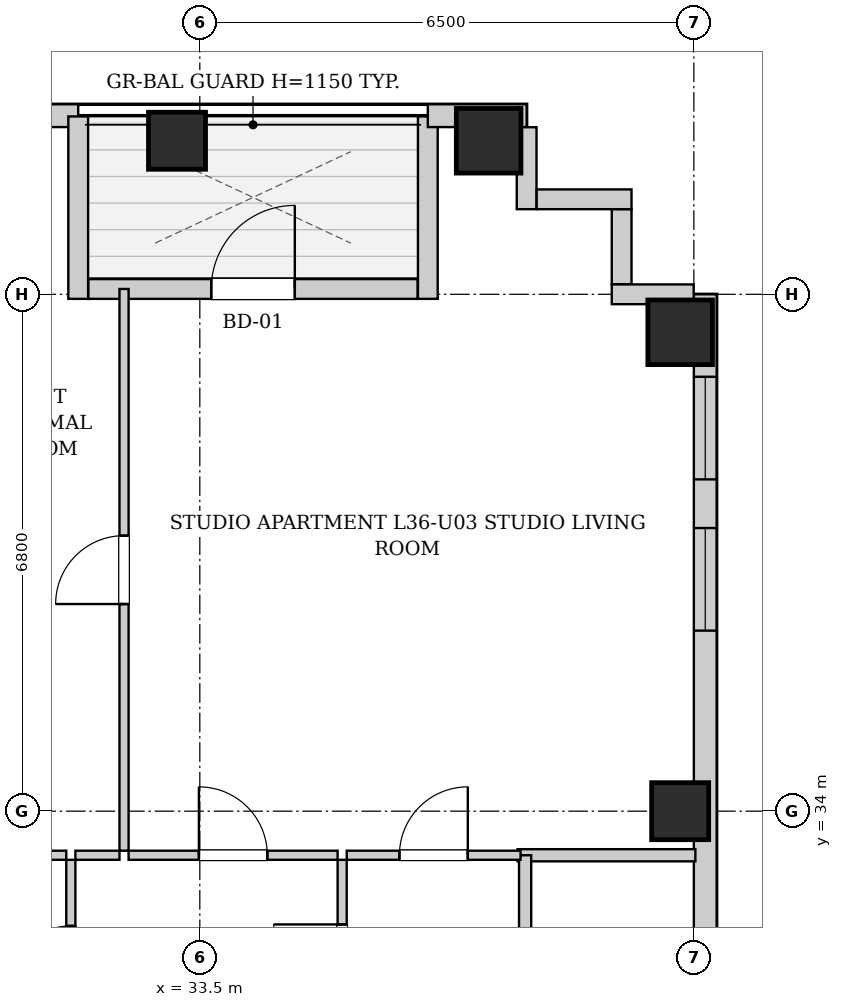
"""IFC4 building model, lengths in metres.
Left out: names, types, materials, properties, quantities, classifications, styles, units other than length and angle.
Written with IfcOpenShell. Run it as: python <this file> out.ifc"""

import sys

from ifc_helpers import new_model, si_unit, direction, frame, frame_2d, origin, origin_2d, place, context, subcontext, project, spatial, rectangle, extrude, element, fill, save


model = new_model("IFC4")
c1 = context("Model", 3, precision=1e-05, world=origin(), true_north=direction((0.0, 1.0)))
c2 = subcontext(c1, "Body", "Model", "MODEL_VIEW")
j1 = project(units=[si_unit("LENGTHUNIT", "METRE"), si_unit("PLANEANGLEUNIT", "RADIAN")], contexts=[c1])
p1 = place(None, origin())
s1 = spatial("IfcSite", under=j1, at=p1, CompositionType="ELEMENT")
p2 = place(p1, origin())
s2 = spatial("IfcBuilding", under=s1, at=p2, CompositionType="ELEMENT")
p3 = place(p2, frame((0.0, 0.0, 127.65)))
s3 = spatial("IfcBuildingStorey", under=s2, at=p3, CompositionType="ELEMENT", Elevation=127.65)
p4 = place(p3, frame((33.2, 42.82, 0.0), z_axis=(0.0, 0.0, 1.0), x_axis=(1.0, 0.0, 0.0)))
e1 = element("IfcColumn", 1, at=p4, inside=s3, PredefinedType="COLUMN", context=c2, shape_type="SweptSolid", body=[
    extrude(rectangle(XDim=0.75, YDim=0.75, at=origin_2d()), origin(), (0.0, 0.0, 1.0), 3.25),
])
p5 = place(p3, frame((37.3, 42.82, 0.0), z_axis=(0.0, 0.0, 1.0), x_axis=(1.0, 0.0, 0.0)))
e2 = element("IfcColumn", 2, at=p5, inside=s3, PredefinedType="COLUMN", context=c2, shape_type="SweptSolid", body=[
    extrude(rectangle(XDim=0.85, YDim=0.85, at=origin_2d()), origin(), (0.0, 0.0, 1.0), 3.25),
])
p6 = place(p3, frame((39.82, 34.0, 0.0), z_axis=(0.0, 0.0, 1.0), x_axis=(1.0, 0.0, 0.0)))
e3 = element("IfcColumn", 3, at=p6, inside=s3, PredefinedType="COLUMN", context=c2, shape_type="SweptSolid", body=[
    extrude(rectangle(XDim=0.75, YDim=0.75, at=origin_2d()), origin(), (0.0, 0.0, 1.0), 3.25),
])
p7 = place(p3, frame((39.82, 40.3, 0.0), z_axis=(0.0, 0.0, 1.0), x_axis=(1.0, 0.0, 0.0)))
e4 = element("IfcColumn", 4, at=p7, inside=s3, PredefinedType="COLUMN", context=c2, shape_type="SweptSolid", body=[
    extrude(rectangle(XDim=0.85, YDim=0.85, at=origin_2d()), origin(), (0.0, 0.0, 1.0), 3.25),
])
p8 = place(p3, frame((10.0, 43.15, 0.0), z_axis=(0.0, 0.0, 1.0), x_axis=(1.0, 0.0, 0.0)))
e5 = element("IfcWall", 5, at=p8, inside=s3, PredefinedType="SOLIDWALL", context=c2, shape_type="SweptSolid", body=[
    extrude(rectangle(XDim=21.9, YDim=0.3, at=frame_2d((10.95, 0.0))), origin(), (0.0, 0.0, 1.0), 2.99),
])
p9 = place(p8, frame((5.475, 0.0, 0.55)))
e6 = element("IfcOpeningElement", 6, at=p9, cuts=e5, PredefinedType="OPENING", context=c2, shape_type="SweptSolid", body=[
    extrude(rectangle(XDim=1.35, YDim=1.2, at=frame_2d((0.675, 0.6))), frame((0.0, 0.16, 0.0), z_axis=(0.0, -1.0, 0.0), x_axis=(1.0, 0.0, 0.0)), (0.0, 0.0, 1.0), 0.32),
])
p10 = place(p8, frame((9.15, 0.0, 0.55)))
e7 = element("IfcOpeningElement", 7, at=p10, cuts=e5, PredefinedType="OPENING", context=c2, shape_type="SweptSolid", body=[
    extrude(rectangle(XDim=1.35, YDim=1.2, at=frame_2d((0.675, 0.6))), frame((0.0, 0.16, 0.0), z_axis=(0.0, -1.0, 0.0), x_axis=(1.0, 0.0, 0.0)), (0.0, 0.0, 1.0), 0.32),
])
p11 = place(p8, frame((17.5, 0.0, 0.55)))
e8 = element("IfcOpeningElement", 8, at=p11, cuts=e5, PredefinedType="OPENING", context=c2, shape_type="SweptSolid", body=[
    extrude(rectangle(XDim=1.35, YDim=1.2, at=frame_2d((0.675, 0.6))), frame((0.0, 0.16, 0.0), z_axis=(0.0, -1.0, 0.0), x_axis=(1.0, 0.0, 0.0)), (0.0, 0.0, 1.0), 0.32),
])
p12 = place(p8, frame((19.8, 0.0, 0.55)))
e9 = element("IfcOpeningElement", 9, at=p12, cuts=e5, PredefinedType="OPENING", context=c2, shape_type="SweptSolid", body=[
    extrude(rectangle(XDim=1.35, YDim=1.2, at=frame_2d((0.675, 0.6))), frame((0.0, 0.16, 0.0), z_axis=(0.0, -1.0, 0.0), x_axis=(1.0, 0.0, 0.0)), (0.0, 0.0, 1.0), 0.32),
])
p13 = place(p3, frame((31.9, 43.14, 0.0), z_axis=(0.0, 0.0, 1.0), x_axis=(0.0, -1.0, 0.0)))
e10 = element("IfcWall", 10, at=p13, inside=s3, PredefinedType="SOLIDWALL", context=c2, shape_type="SweptSolid", body=[
    extrude(rectangle(XDim=2.4, YDim=0.26, at=frame_2d((1.2, 0.0))), origin(), (0.0, 0.0, 1.0), 2.99),
])
p14 = place(p3, frame((32.034, 40.87, 0.0), z_axis=(0.0, 0.0, 1.0), x_axis=(1.0, 0.0, 0.0)))
e11 = element("IfcWall", 11, at=p14, inside=s3, PredefinedType="SOLIDWALL", context=c2, shape_type="SweptSolid", body=[
    extrude(rectangle(XDim=4.332, YDim=0.26, at=frame_2d((2.166, 0.0))), origin(), (0.0, 0.0, 1.0), 2.99),
])
p15 = place(p14, frame((1.616, 0.0, 0.0)))
e12 = element("IfcOpeningElement", 12, at=p15, cuts=e11, PredefinedType="OPENING", context=c2, shape_type="SweptSolid", body=[
    extrude(rectangle(XDim=1.1, YDim=2.0, at=frame_2d((0.55, 1.0))), frame((0.0, 0.14, 0.0), z_axis=(0.0, -1.0, 0.0), x_axis=(1.0, 0.0, 0.0)), (0.0, 0.0, 1.0), 0.28),
])
p16 = place(p3, frame((36.5, 40.74, 0.0), z_axis=(0.0, 0.0, 1.0), x_axis=(0.0, 1.0, 0.0)))
e13 = element("IfcWall", 13, at=p16, inside=s3, PredefinedType="SOLIDWALL", context=c2, shape_type="SweptSolid", body=[
    extrude(rectangle(XDim=2.4, YDim=0.26, at=frame_2d((1.2, 0.0))), origin(), (0.0, 0.0, 1.0), 2.99),
])
p17 = place(p3, frame((36.5, 43.15, 0.0), z_axis=(0.0, 0.0, 1.0), x_axis=(1.0, 0.0, 0.0)))
e14 = element("IfcWall", 14, at=p17, inside=s3, PredefinedType="SOLIDWALL", context=c2, shape_type="SweptSolid", body=[
    extrude(rectangle(XDim=1.3, YDim=0.3, at=frame_2d((0.65, 0.0))), origin(), (0.0, 0.0, 1.0), 2.99),
])
p18 = place(p3, frame((40.15, 40.8, 0.0), z_axis=(0.0, 0.0, 1.0), x_axis=(0.0, -1.0, 0.0)))
e15 = element("IfcWall", 15, at=p18, inside=s3, PredefinedType="SOLIDWALL", context=c2, shape_type="SweptSolid", body=[
    extrude(rectangle(XDim=34.5, YDim=0.3, at=frame_2d((17.25, 0.0))), origin(), (0.0, 0.0, 1.0), 2.99),
])
p19 = place(p18, frame((31.575, 0.0, 0.55)))
e16 = element("IfcOpeningElement", 16, at=p19, cuts=e15, PredefinedType="OPENING", context=c2, shape_type="SweptSolid", body=[
    extrude(rectangle(XDim=1.35, YDim=1.2, at=frame_2d((0.675, 0.6))), frame((0.0, 0.16, 0.0), z_axis=(0.0, -1.0, 0.0), x_axis=(1.0, 0.0, 0.0)), (0.0, 0.0, 1.0), 0.32),
])
p20 = place(p18, frame((3.075, 0.0, 0.55)))
e17 = element("IfcOpeningElement", 17, at=p20, cuts=e15, PredefinedType="OPENING", context=c2, shape_type="SweptSolid", body=[
    extrude(rectangle(XDim=1.35, YDim=1.2, at=frame_2d((0.675, 0.6))), frame((0.0, 0.16, 0.0), z_axis=(0.0, -1.0, 0.0), x_axis=(1.0, 0.0, 0.0)), (0.0, 0.0, 1.0), 0.32),
])
p21 = place(p18, frame((1.085, 0.0, 0.55)))
e18 = element("IfcOpeningElement", 18, at=p21, cuts=e15, PredefinedType="OPENING", context=c2, shape_type="SweptSolid", body=[
    extrude(rectangle(XDim=1.35, YDim=1.2, at=frame_2d((0.675, 0.6))), frame((0.0, 0.16, 0.0), z_axis=(0.0, -1.0, 0.0), x_axis=(1.0, 0.0, 0.0)), (0.0, 0.0, 1.0), 0.32),
])
p22 = place(p18, frame((22.8, 0.0, 0.55)))
e19 = element("IfcOpeningElement", 19, at=p22, cuts=e15, PredefinedType="OPENING", context=c2, shape_type="SweptSolid", body=[
    extrude(rectangle(XDim=1.35, YDim=1.2, at=frame_2d((0.675, 0.6))), frame((0.0, 0.16, 0.0), z_axis=(0.0, -1.0, 0.0), x_axis=(1.0, 0.0, 0.0)), (0.0, 0.0, 1.0), 0.32),
])
p23 = place(p18, frame((13.425, 0.0, 0.55)))
e20 = element("IfcOpeningElement", 20, at=p23, cuts=e15, PredefinedType="OPENING", context=c2, shape_type="SweptSolid", body=[
    extrude(rectangle(XDim=1.35, YDim=1.2, at=frame_2d((0.675, 0.6))), frame((0.0, 0.16, 0.0), z_axis=(0.0, -1.0, 0.0), x_axis=(1.0, 0.0, 0.0)), (0.0, 0.0, 1.0), 0.32),
])
p24 = place(p3, frame((37.8, 42.998, 0.0), z_axis=(0.0, 0.0, 1.0), x_axis=(0.0, -1.0, 0.0)))
e21 = element("IfcWall", 21, at=p24, inside=s3, PredefinedType="SOLIDWALL", context=c2, shape_type="SweptSolid", body=[
    extrude(rectangle(XDim=1.078, YDim=0.26, at=frame_2d((0.539, 0.0))), origin(), (0.0, 0.0, 1.0), 2.99),
])
p25 = place(p3, frame((37.932, 42.05, 0.0), z_axis=(0.0, 0.0, 1.0), x_axis=(1.0, 0.0, 0.0)))
e22 = element("IfcWall", 22, at=p25, inside=s3, PredefinedType="SOLIDWALL", context=c2, shape_type="SweptSolid", body=[
    extrude(rectangle(XDim=1.248, YDim=0.26, at=frame_2d((0.624, 0.0))), origin(), (0.0, 0.0, 1.0), 2.99),
])
p26 = place(p3, frame((39.05, 41.918, 0.0), z_axis=(0.0, 0.0, 1.0), x_axis=(0.0, -1.0, 0.0)))
e23 = element("IfcWall", 23, at=p26, inside=s3, PredefinedType="SOLIDWALL", context=c2, shape_type="SweptSolid", body=[
    extrude(rectangle(XDim=0.986, YDim=0.26, at=frame_2d((0.493, 0.0))), origin(), (0.0, 0.0, 1.0), 2.99),
])
p27 = place(p3, frame((38.92, 40.8, 0.0), z_axis=(0.0, 0.0, 1.0), x_axis=(1.0, 0.0, 0.0)))
e24 = element("IfcWall", 24, at=p27, inside=s3, PredefinedType="SOLIDWALL", context=c2, shape_type="SweptSolid", body=[
    extrude(rectangle(XDim=1.078, YDim=0.26, at=frame_2d((0.539, 0.0))), origin(), (0.0, 0.0, 1.0), 2.99),
])
p28 = place(p3, frame((37.68, 33.42, 0.0), z_axis=(0.0, 0.0, 1.0), x_axis=(1.0, 0.0, 0.0)))
e25 = element("IfcWall", 25, at=p28, inside=s3, PredefinedType="PARTITIONING", context=c2, shape_type="SweptSolid", body=[
    extrude(rectangle(XDim=2.34, YDim=0.16, at=frame_2d((1.17, 0.0))), origin(), (0.0, 0.0, 1.0), 2.99),
])
p29 = place(p3, frame((37.78, 30.76, 0.0), z_axis=(0.0, 0.0, 1.0), x_axis=(0.0, 1.0, 0.0)))
e26 = element("IfcWall", 26, at=p29, inside=s3, PredefinedType="PARTITIONING", context=c2, shape_type="SweptSolid", body=[
    extrude(rectangle(XDim=2.66, YDim=0.16, at=frame_2d((1.33, 0.0))), origin(), (0.0, 0.0, 1.0), 2.99),
])
p30 = place(p3, frame((31.803, 30.76, 0.0), z_axis=(0.0, 0.0, 1.0), x_axis=(0.0, 1.0, 0.0)))
e27 = element("IfcWall", 27, at=p30, inside=s3, PredefinedType="PARTITIONING", context=c2, shape_type="SweptSolid", body=[
    extrude(rectangle(XDim=2.6, YDim=0.12, at=frame_2d((1.3, 0.0))), origin(), (0.0, 0.0, 1.0), 2.99),
])
p31 = place(p30, frame((0.87, 0.0, 0.0)))
e28 = element("IfcOpeningElement", 28, at=p31, cuts=e27, PredefinedType="OPENING", context=c2, shape_type="SweptSolid", body=[
    extrude(rectangle(XDim=0.86, YDim=2.05, at=frame_2d((0.43, 1.025))), frame((0.0, 0.07, 0.0), z_axis=(0.0, -1.0, 0.0), x_axis=(1.0, 0.0, 0.0)), (0.0, 0.0, 1.0), 0.14),
])
p32 = place(p3, frame((29.343, 33.42, 0.0), z_axis=(0.0, 0.0, 1.0), x_axis=(1.0, 0.0, 0.0)))
e29 = element("IfcWall", 29, at=p32, inside=s3, PredefinedType="PARTITIONING", context=c2, shape_type="SweptSolid", body=[
    extrude(rectangle(XDim=2.4, YDim=0.12, at=frame_2d((1.2, 0.0))), origin(), (0.0, 0.0, 1.0), 2.99),
])
p33 = place(p3, frame((35.373, 30.76, 0.0), z_axis=(0.0, 0.0, 1.0), x_axis=(0.0, 1.0, 0.0)))
e30 = element("IfcWall", 30, at=p33, inside=s3, PredefinedType="PARTITIONING", context=c2, shape_type="SweptSolid", body=[
    extrude(rectangle(XDim=2.6, YDim=0.12, at=frame_2d((1.3, 0.0))), origin(), (0.0, 0.0, 1.0), 2.99),
])
p34 = place(p33, frame((0.85, 0.0, 0.0)))
e31 = element("IfcOpeningElement", 31, at=p34, cuts=e30, PredefinedType="OPENING", context=c2, shape_type="SweptSolid", body=[
    extrude(rectangle(XDim=0.9, YDim=2.05, at=frame_2d((0.45, 1.025))), frame((0.0, 0.07, 0.0), z_axis=(0.0, -1.0, 0.0), x_axis=(1.0, 0.0, 0.0)), (0.0, 0.0, 1.0), 0.14),
])
p35 = place(p3, frame((31.863, 33.42, 0.0), z_axis=(0.0, 0.0, 1.0), x_axis=(1.0, 0.0, 0.0)))
e32 = element("IfcWall", 32, at=p35, inside=s3, PredefinedType="PARTITIONING", context=c2, shape_type="SweptSolid", body=[
    extrude(rectangle(XDim=0.58, YDim=0.12, at=frame_2d((0.29, 0.0))), origin(), (0.0, 0.0, 1.0), 2.99),
])
p36 = place(p3, frame((32.563, 33.42, 0.0), z_axis=(0.0, 0.0, 1.0), x_axis=(1.0, 0.0, 0.0)))
e33 = element("IfcWall", 33, at=p36, inside=s3, PredefinedType="PARTITIONING", context=c2, shape_type="SweptSolid", body=[
    extrude(rectangle(XDim=2.75, YDim=0.12, at=frame_2d((1.375, 0.0))), origin(), (0.0, 0.0, 1.0), 2.99),
])
p37 = place(p36, frame((0.925, 0.0, 0.0)))
e34 = element("IfcOpeningElement", 34, at=p37, cuts=e33, PredefinedType="OPENING", context=c2, shape_type="SweptSolid", body=[
    extrude(rectangle(XDim=0.9, YDim=2.05, at=frame_2d((0.45, 1.025))), frame((0.0, 0.07, 0.0), z_axis=(0.0, -1.0, 0.0), x_axis=(1.0, 0.0, 0.0)), (0.0, 0.0, 1.0), 0.14),
])
p38 = place(p3, frame((35.433, 33.42, 0.0), z_axis=(0.0, 0.0, 1.0), x_axis=(1.0, 0.0, 0.0)))
e35 = element("IfcWall", 35, at=p38, inside=s3, PredefinedType="PARTITIONING", context=c2, shape_type="SweptSolid", body=[
    extrude(rectangle(XDim=2.287, YDim=0.12, at=frame_2d((1.144, 0.0))), origin(), (0.0, 0.0, 1.0), 2.99),
])
p39 = place(p38, frame((0.693, 0.0, 0.0)))
e36 = element("IfcOpeningElement", 36, at=p39, cuts=e35, PredefinedType="OPENING", context=c2, shape_type="SweptSolid", body=[
    extrude(rectangle(XDim=0.9, YDim=2.05, at=frame_2d((0.45, 1.025))), frame((0.0, 0.07, 0.0), z_axis=(0.0, -1.0, 0.0), x_axis=(1.0, 0.0, 0.0)), (0.0, 0.0, 1.0), 0.14),
])
p40 = place(p3, frame((32.503, 33.48, 0.0), z_axis=(0.0, 0.0, 1.0), x_axis=(0.0, 1.0, 0.0)))
e37 = element("IfcWall", 37, at=p40, inside=s3, PredefinedType="PARTITIONING", context=c2, shape_type="SweptSolid", body=[
    extrude(rectangle(XDim=7.39, YDim=0.12, at=frame_2d((3.695, 0.0))), origin(), (0.0, 0.0, 1.0), 2.99),
])
p41 = place(p40, frame((3.245, 0.0, 0.0)))
e38 = element("IfcOpeningElement", 38, at=p41, cuts=e37, PredefinedType="OPENING", context=c2, shape_type="SweptSolid", body=[
    extrude(rectangle(XDim=0.9, YDim=2.05, at=frame_2d((0.45, 1.025))), frame((0.0, 0.07, 0.0), z_axis=(0.0, -1.0, 0.0), x_axis=(1.0, 0.0, 0.0)), (0.0, 0.0, 1.0), 0.14),
])
p42 = place(p31, origin())
e39 = element("IfcDoor", 39, at=p42, inside=s3, OperationType="SINGLE_SWING_LEFT", PredefinedType="DOOR", context=c2, shape_type="SweptSolid", body=[
    extrude(rectangle(XDim=0.86, YDim=2.05, at=frame_2d((0.43, 1.025))), frame((0.0, 0.025, 0.0), z_axis=(0.0, -1.0, 0.0), x_axis=(1.0, 0.0, 0.0)), (0.0, 0.0, 1.0), 0.05),
])
fill(e28, e39)
p43 = place(p34, origin())
e40 = element("IfcDoor", 40, at=p43, inside=s3, OperationType="SINGLE_SWING_RIGHT", PredefinedType="DOOR", context=c2, shape_type="SweptSolid", body=[
    extrude(rectangle(XDim=0.9, YDim=2.05, at=frame_2d((0.45, 1.025))), frame((0.0, 0.025, 0.0), z_axis=(0.0, -1.0, 0.0), x_axis=(1.0, 0.0, 0.0)), (0.0, 0.0, 1.0), 0.05),
])
fill(e31, e40)
p44 = place(p37, origin())
e41 = element("IfcDoor", 41, at=p44, inside=s3, OperationType="SINGLE_SWING_LEFT", PredefinedType="DOOR", context=c2, shape_type="SweptSolid", body=[
    extrude(rectangle(XDim=0.9, YDim=2.05, at=frame_2d((0.45, 1.025))), frame((0.0, 0.025, 0.0), z_axis=(0.0, -1.0, 0.0), x_axis=(1.0, 0.0, 0.0)), (0.0, 0.0, 1.0), 0.05),
])
fill(e34, e41)
p45 = place(p39, origin())
e42 = element("IfcDoor", 42, at=p45, inside=s3, OperationType="SINGLE_SWING_RIGHT", PredefinedType="DOOR", context=c2, shape_type="SweptSolid", body=[
    extrude(rectangle(XDim=0.9, YDim=2.05, at=frame_2d((0.45, 1.025))), frame((0.0, 0.025, 0.0), z_axis=(0.0, -1.0, 0.0), x_axis=(1.0, 0.0, 0.0)), (0.0, 0.0, 1.0), 0.05),
])
fill(e36, e42)
p46 = place(p41, origin())
e43 = element("IfcDoor", 43, at=p46, inside=s3, OperationType="SINGLE_SWING_LEFT", PredefinedType="DOOR", context=c2, shape_type="SweptSolid", body=[
    extrude(rectangle(XDim=0.9, YDim=2.05, at=frame_2d((0.45, 1.025))), frame((0.0, 0.025, 0.0), z_axis=(0.0, -1.0, 0.0), x_axis=(1.0, 0.0, 0.0)), (0.0, 0.0, 1.0), 0.05),
])
fill(e38, e43)
p47 = place(p15, origin())
e44 = element("IfcDoor", 44, at=p47, inside=s3, OperationType="SINGLE_SWING_RIGHT", PredefinedType="DOOR", context=c2, shape_type="SweptSolid", body=[
    extrude(rectangle(XDim=1.1, YDim=2.0, at=frame_2d((0.55, 1.0))), frame((0.0, 0.025, 0.0), z_axis=(0.0, -1.0, 0.0), x_axis=(1.0, 0.0, 0.0)), (0.0, 0.0, 1.0), 0.05),
])
fill(e12, e44)
p48 = place(p20, origin())
e45 = element("IfcWindow", 45, at=p48, inside=s3, PartitioningType="SINGLE_PANEL", PredefinedType="WINDOW", context=c2, shape_type="SweptSolid", body=[
    extrude(rectangle(XDim=1.35, YDim=1.2, at=frame_2d((0.675, 0.6))), frame((0.0, 0.03, 0.0), z_axis=(0.0, -1.0, 0.0), x_axis=(1.0, 0.0, 0.0)), (0.0, 0.0, 1.0), 0.06),
])
fill(e17, e45)
p49 = place(p21, origin())
e46 = element("IfcWindow", 46, at=p49, inside=s3, PartitioningType="SINGLE_PANEL", PredefinedType="WINDOW", context=c2, shape_type="SweptSolid", body=[
    extrude(rectangle(XDim=1.35, YDim=1.2, at=frame_2d((0.675, 0.6))), frame((0.0, 0.03, 0.0), z_axis=(0.0, -1.0, 0.0), x_axis=(1.0, 0.0, 0.0)), (0.0, 0.0, 1.0), 0.06),
])
fill(e18, e46)
save(model, sys.argv[1])
